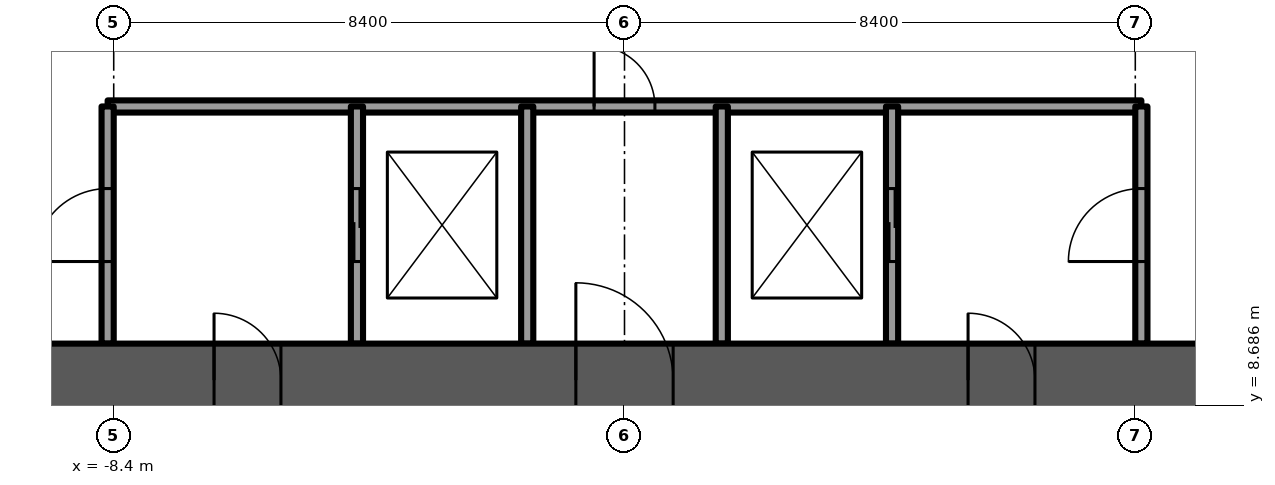
"""IFC4 building model, lengths in metres.
Left out: names, types, materials, properties, quantities, classifications, styles, units other than length and angle.
Written with IfcOpenShell. Run it as: python <this file> out.ifc"""

import sys

from ifc_helpers import new_model, si_unit, direction, frame, frame_2d, origin, place, context, subcontext, project, spatial, rectangle, extrude, element, fill, save


model = new_model("IFC4")
c1 = context("Model", 3, precision=1e-05, world=origin(), true_north=direction((0.0, 1.0)))
c2 = subcontext(c1, "Body", "Model", "MODEL_VIEW")
j1 = project(units=[si_unit("LENGTHUNIT", "METRE"), si_unit("PLANEANGLEUNIT", "RADIAN")], contexts=[c1])
p1 = place(None, origin())
s1 = spatial("IfcSite", under=j1, at=p1, CompositionType="ELEMENT")
p2 = place(p1, origin())
s2 = spatial("IfcBuilding", under=s1, at=p2, CompositionType="ELEMENT")
p3 = place(p2, frame((0.0, 0.0, 65.5)))
s3 = spatial("IfcBuildingStorey", under=s2, at=p3, CompositionType="ELEMENT", Elevation=65.5)
p4 = place(p3, frame((-12.0, 9.1, -0.3), z_axis=(0.0, 0.0, 1.0), x_axis=(1.0, 0.0, 0.0)))
e1 = element("IfcWall", 1, at=p4, inside=s3, PredefinedType="SHEAR", context=c2, shape_type="SweptSolid", body=[
    extrude(rectangle(XDim=24.0, YDim=1.2, at=frame_2d((12.0, 0.0))), origin(), (0.0, 0.0, 1.0), 3.75),
])
p5 = place(p4, frame((11.2, 0.0, 0.0)))
e2 = element("IfcOpeningElement", 2, at=p5, cuts=e1, PredefinedType="OPENING", context=c2, shape_type="SweptSolid", body=[
    extrude(rectangle(XDim=1.6, YDim=2.1, at=frame_2d((0.8, 1.05))), frame((0.0, 0.6, 0.0), z_axis=(0.0, -1.0, 0.0), x_axis=(1.0, 0.0, 0.0)), (0.0, 0.0, 1.0), 1.2),
])
p6 = place(p4, frame((5.25, 0.0, 0.0)))
e3 = element("IfcOpeningElement", 3, at=p6, cuts=e1, PredefinedType="OPENING", context=c2, shape_type="SweptSolid", body=[
    extrude(rectangle(XDim=1.1, YDim=2.1, at=frame_2d((0.55, 1.05))), frame((0.0, 0.6, 0.0), z_axis=(0.0, -1.0, 0.0), x_axis=(1.0, 0.0, 0.0)), (0.0, 0.0, 1.0), 1.2),
])
p7 = place(p4, frame((17.65, 0.0, 0.0)))
e4 = element("IfcOpeningElement", 4, at=p7, cuts=e1, PredefinedType="OPENING", context=c2, shape_type="SweptSolid", body=[
    extrude(rectangle(XDim=1.1, YDim=2.1, at=frame_2d((0.55, 1.05))), frame((0.0, 0.6, 0.0), z_axis=(0.0, -1.0, 0.0), x_axis=(1.0, 0.0, 0.0)), (0.0, 0.0, 1.0), 1.2),
])
p8 = place(p3, frame((-8.5, 13.6, 0.0), z_axis=(0.0, 0.0, 1.0), x_axis=(1.0, 0.0, 0.0)))
e5 = element("IfcWall", 5, at=p8, inside=s3, PredefinedType="PARTITIONING", context=c2, shape_type="SweptSolid", body=[
    extrude(rectangle(XDim=17.0, YDim=0.2, at=frame_2d((8.5, 0.0))), origin(), (0.0, 0.0, 1.0), 3.45),
])
p9 = place(p8, frame((8.0, 0.0, 0.0)))
e6 = element("IfcOpeningElement", 6, at=p9, cuts=e5, PredefinedType="OPENING", context=c2, shape_type="SweptSolid", body=[
    extrude(rectangle(XDim=1.0, YDim=2.1, at=frame_2d((0.5, 1.05))), frame((0.0, 0.1, 0.0), z_axis=(0.0, -1.0, 0.0), x_axis=(1.0, 0.0, 0.0)), (0.0, 0.0, 1.0), 0.2),
])
p10 = place(p3, frame((-8.5, 9.7, 0.0), z_axis=(0.0, 0.0, 1.0), x_axis=(0.0, 1.0, 0.0)))
e7 = element("IfcWall", 7, at=p10, inside=s3, PredefinedType="PARTITIONING", context=c2, shape_type="SweptSolid", body=[
    extrude(rectangle(XDim=3.9, YDim=0.2, at=frame_2d((1.95, 0.0))), origin(), (0.0, 0.0, 1.0), 3.45),
])
p11 = place(p10, frame((1.35, 0.0, 0.0)))
e8 = element("IfcOpeningElement", 8, at=p11, cuts=e7, PredefinedType="OPENING", context=c2, shape_type="SweptSolid", body=[
    extrude(rectangle(XDim=1.2, YDim=2.1, at=frame_2d((0.6, 1.05))), frame((0.0, 0.1, 0.0), z_axis=(0.0, -1.0, 0.0), x_axis=(1.0, 0.0, 0.0)), (0.0, 0.0, 1.0), 0.2),
])
p12 = place(p3, frame((8.5, 9.7, 0.0), z_axis=(0.0, 0.0, 1.0), x_axis=(0.0, 1.0, 0.0)))
e9 = element("IfcWall", 9, at=p12, inside=s3, PredefinedType="PARTITIONING", context=c2, shape_type="SweptSolid", body=[
    extrude(rectangle(XDim=3.9, YDim=0.2, at=frame_2d((1.95, 0.0))), origin(), (0.0, 0.0, 1.0), 3.45),
])
p13 = place(p12, frame((1.35, 0.0, 0.0)))
e10 = element("IfcOpeningElement", 10, at=p13, cuts=e9, PredefinedType="OPENING", context=c2, shape_type="SweptSolid", body=[
    extrude(rectangle(XDim=1.2, YDim=2.1, at=frame_2d((0.6, 1.05))), frame((0.0, 0.1, 0.0), z_axis=(0.0, -1.0, 0.0), x_axis=(1.0, 0.0, 0.0)), (0.0, 0.0, 1.0), 0.2),
])
p14 = place(p3, frame((-4.4, 9.7, 0.0), z_axis=(0.0, 0.0, 1.0), x_axis=(0.0, 1.0, 0.0)))
e11 = element("IfcWall", 11, at=p14, inside=s3, PredefinedType="PARTITIONING", context=c2, shape_type="SweptSolid", body=[
    extrude(rectangle(XDim=3.9, YDim=0.2, at=frame_2d((1.95, 0.0))), origin(), (0.0, 0.0, 1.0), 3.45),
])
p15 = place(p14, frame((1.35, 0.0, 0.0)))
e12 = element("IfcOpeningElement", 12, at=p15, cuts=e11, PredefinedType="OPENING", context=c2, shape_type="SweptSolid", body=[
    extrude(rectangle(XDim=1.2, YDim=2.1, at=frame_2d((0.6, 1.05))), frame((0.0, 0.1, 0.0), z_axis=(0.0, -1.0, 0.0), x_axis=(1.0, 0.0, 0.0)), (0.0, 0.0, 1.0), 0.2),
])
p16 = place(p3, frame((4.4, 9.7, 0.0), z_axis=(0.0, 0.0, 1.0), x_axis=(0.0, 1.0, 0.0)))
e13 = element("IfcWall", 13, at=p16, inside=s3, PredefinedType="PARTITIONING", context=c2, shape_type="SweptSolid", body=[
    extrude(rectangle(XDim=3.9, YDim=0.2, at=frame_2d((1.95, 0.0))), origin(), (0.0, 0.0, 1.0), 3.45),
])
p17 = place(p16, frame((1.35, 0.0, 0.0)))
e14 = element("IfcOpeningElement", 14, at=p17, cuts=e13, PredefinedType="OPENING", context=c2, shape_type="SweptSolid", body=[
    extrude(rectangle(XDim=1.2, YDim=2.1, at=frame_2d((0.6, 1.05))), frame((0.0, 0.1, 0.0), z_axis=(0.0, -1.0, 0.0), x_axis=(1.0, 0.0, 0.0)), (0.0, 0.0, 1.0), 0.2),
])
for number, where, z_axis, x_axis in (
    (15, (-1.6, 9.7, 0.0), (0.0, 0.0, 1.0), (0.0, 1.0, 0.0)),
    (16, (1.6, 9.7, 0.0), (0.0, 0.0, 1.0), (0.0, 1.0, 0.0)),
):
    element("IfcWall", number, at=place(p3, frame(where, z_axis=z_axis, x_axis=x_axis)), inside=s3, PredefinedType="PARTITIONING", context=c2, shape_type="SweptSolid", body=[
        extrude(rectangle(XDim=3.9, YDim=0.2, at=frame_2d((1.95, 0.0))), origin(), (0.0, 0.0, 1.0), 3.45),
    ])
p18 = place(p5, origin())
e17 = element("IfcDoor", 17, at=p18, inside=s3, OperationType="DOUBLE_DOOR_SINGLE_SWING", PredefinedType="DOOR", context=c2, shape_type="SweptSolid", body=[
    extrude(rectangle(XDim=1.6, YDim=2.1, at=frame_2d((0.8, 1.05))), frame((0.0, 0.025, 0.0), z_axis=(0.0, -1.0, 0.0), x_axis=(1.0, 0.0, 0.0)), (0.0, 0.0, 1.0), 0.05),
])
fill(e2, e17)
p19 = place(p6, origin())
e18 = element("IfcDoor", 18, at=p19, inside=s3, OperationType="SINGLE_SWING_LEFT", PredefinedType="DOOR", context=c2, shape_type="SweptSolid", body=[
    extrude(rectangle(XDim=1.1, YDim=2.1, at=frame_2d((0.55, 1.05))), frame((0.0, 0.025, 0.0), z_axis=(0.0, -1.0, 0.0), x_axis=(1.0, 0.0, 0.0)), (0.0, 0.0, 1.0), 0.05),
])
fill(e3, e18)
p20 = place(p7, origin())
e19 = element("IfcDoor", 19, at=p20, inside=s3, OperationType="SINGLE_SWING_RIGHT", PredefinedType="DOOR", context=c2, shape_type="SweptSolid", body=[
    extrude(rectangle(XDim=1.1, YDim=2.1, at=frame_2d((0.55, 1.05))), frame((0.0, 0.025, 0.0), z_axis=(0.0, -1.0, 0.0), x_axis=(1.0, 0.0, 0.0)), (0.0, 0.0, 1.0), 0.05),
])
fill(e4, e19)
p21 = place(p15, origin())
e20 = element("IfcDoor", 20, at=p21, inside=s3, OperationType="SLIDING_TO_LEFT", PredefinedType="DOOR", context=c2, shape_type="SweptSolid", body=[
    extrude(rectangle(XDim=1.2, YDim=2.1, at=frame_2d((0.6, 1.05))), frame((0.0, 0.025, 0.0), z_axis=(0.0, -1.0, 0.0), x_axis=(1.0, 0.0, 0.0)), (0.0, 0.0, 1.0), 0.05),
])
fill(e12, e20)
p22 = place(p11, origin())
e21 = element("IfcDoor", 21, at=p22, inside=s3, OperationType="SINGLE_SWING_LEFT", PredefinedType="DOOR", context=c2, shape_type="SweptSolid", body=[
    extrude(rectangle(XDim=1.2, YDim=2.1, at=frame_2d((0.6, 1.05))), frame((0.0, 0.025, 0.0), z_axis=(0.0, -1.0, 0.0), x_axis=(1.0, 0.0, 0.0)), (0.0, 0.0, 1.0), 0.05),
])
fill(e8, e21)
p23 = place(p17, origin())
e22 = element("IfcDoor", 22, at=p23, inside=s3, OperationType="SLIDING_TO_LEFT", PredefinedType="DOOR", context=c2, shape_type="SweptSolid", body=[
    extrude(rectangle(XDim=1.2, YDim=2.1, at=frame_2d((0.6, 1.05))), frame((0.0, 0.025, 0.0), z_axis=(0.0, -1.0, 0.0), x_axis=(1.0, 0.0, 0.0)), (0.0, 0.0, 1.0), 0.05),
])
fill(e14, e22)
p24 = place(p13, origin())
e23 = element("IfcDoor", 23, at=p24, inside=s3, OperationType="SINGLE_SWING_LEFT", PredefinedType="DOOR", context=c2, shape_type="SweptSolid", body=[
    extrude(rectangle(XDim=1.2, YDim=2.1, at=frame_2d((0.6, 1.05))), frame((0.0, 0.025, 0.0), z_axis=(0.0, -1.0, 0.0), x_axis=(1.0, 0.0, 0.0)), (0.0, 0.0, 1.0), 0.05),
])
fill(e10, e23)
p25 = place(p9, origin())
e24 = element("IfcDoor", 24, at=p25, inside=s3, OperationType="SINGLE_SWING_LEFT", PredefinedType="DOOR", context=c2, shape_type="SweptSolid", body=[
    extrude(rectangle(XDim=1.0, YDim=2.1, at=frame_2d((0.5, 1.05))), frame((0.0, 0.025, 0.0), z_axis=(0.0, -1.0, 0.0), x_axis=(1.0, 0.0, 0.0)), (0.0, 0.0, 1.0), 0.05),
])
fill(e6, e24)
save(model, sys.argv[1])
